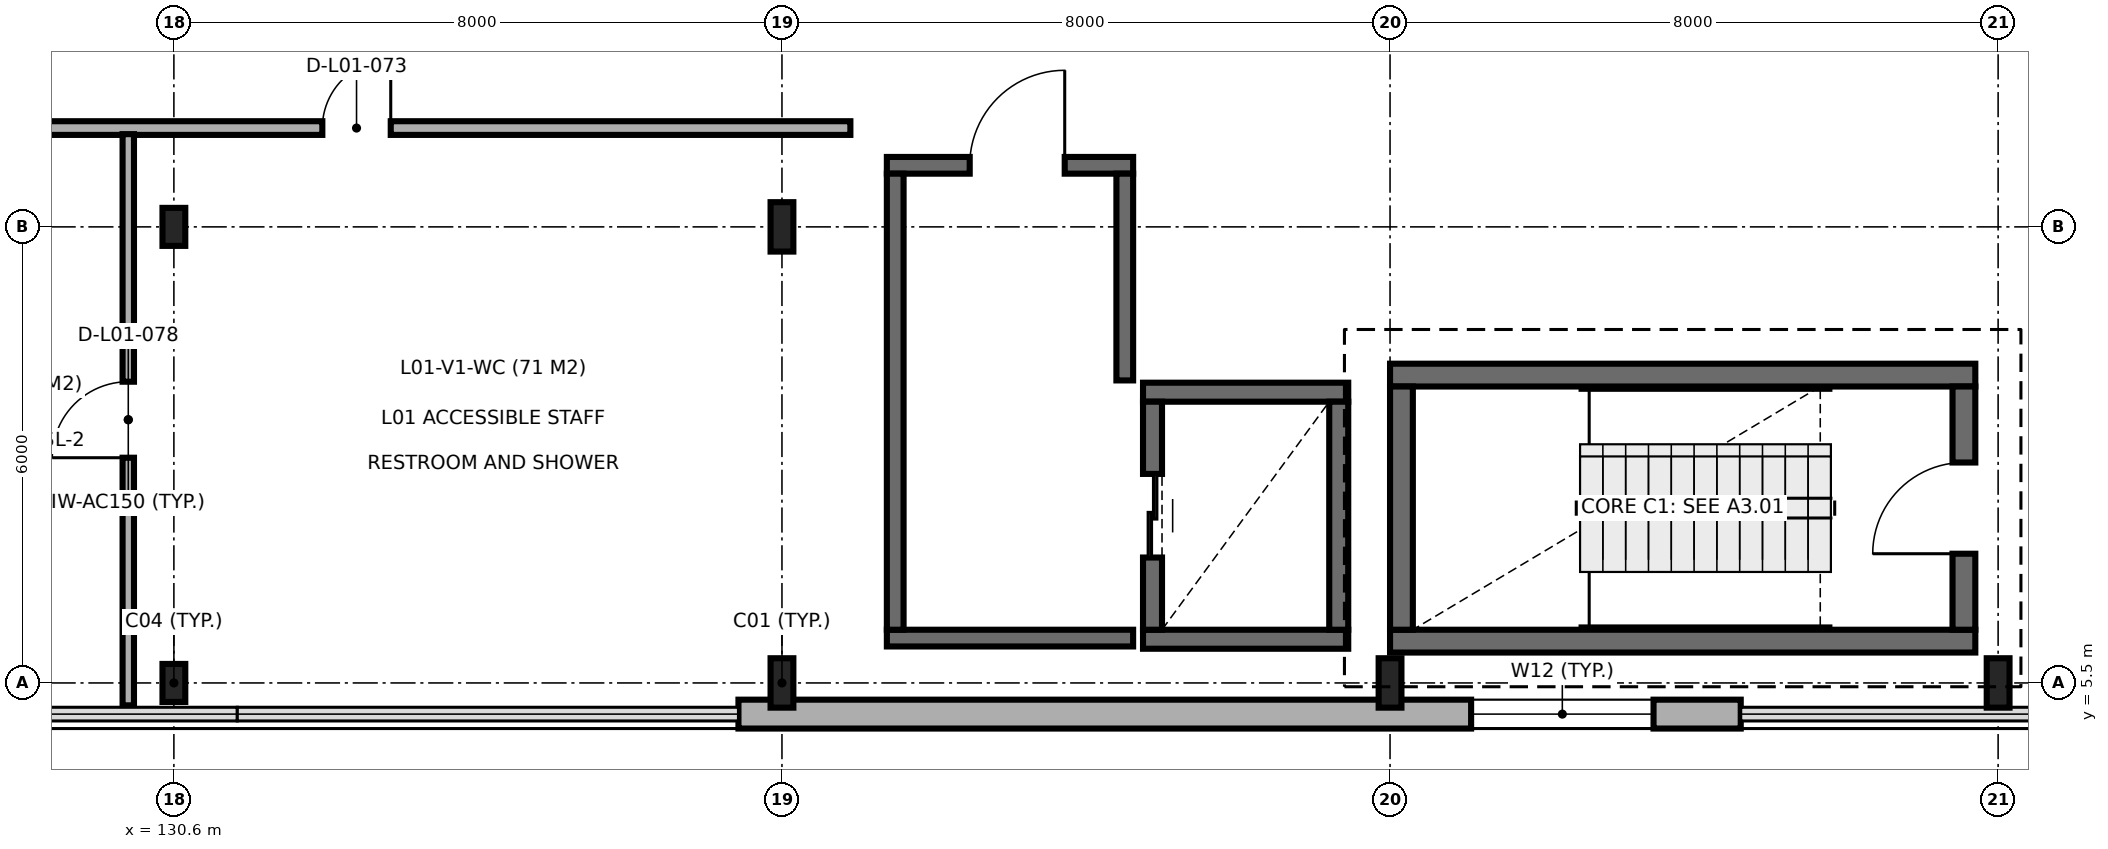
"""IFC4 building model, lengths in metres.
Left out: names, types, materials, properties, quantities, classifications, styles, units other than length and angle.
Written with IfcOpenShell. Run it as: python <this file> out.ifc"""

import sys

from ifc_helpers import new_model, si_unit, direction, frame, frame_2d, origin, origin_2d, place, context, subcontext, project, spatial, rectangle, i_section, extrude, element, fill, save


model = new_model("IFC4")
c1 = context("Model", 3, precision=1e-05, world=origin(), true_north=direction((0.0, 1.0)))
c2 = subcontext(c1, "Body", "Model", "MODEL_VIEW")
j1 = project(units=[si_unit("LENGTHUNIT", "METRE"), si_unit("PLANEANGLEUNIT", "RADIAN")], contexts=[c1])
p1 = place(None, origin())
s1 = spatial("IfcSite", under=j1, at=p1, CompositionType="ELEMENT")
p2 = place(p1, origin())
s2 = spatial("IfcBuilding", under=s1, at=p2, CompositionType="ELEMENT")
p3 = place(p2, frame((0.0, 0.0, 4.8)))
s3 = spatial("IfcBuildingStorey", under=s2, at=p3, CompositionType="ELEMENT", Elevation=4.8)
for number, where, z_axis, x_axis in (
    (1, (130.6, 5.5, 0.0), (0.0, 0.0, 1.0), (1.0, 0.0, 0.0)),
    (2, (130.6, 11.5, 0.0), (0.0, 0.0, 1.0), (1.0, 0.0, 0.0)),
):
    element("IfcColumn", number, at=place(p3, frame(where, z_axis=z_axis, x_axis=x_axis)), inside=s3, PredefinedType="COLUMN", context=c2, shape_type="SweptSolid", body=[
        extrude(i_section(OverallWidth=0.3, OverallDepth=0.5, WebThickness=0.014, FlangeThickness=0.028, FilletRadius=0.027, at=origin_2d()), origin(), (0.0, 0.0, 1.0), 4.5),
    ])
for number, where, z_axis, x_axis in (
    (3, (138.6, 5.5, 0.0), (0.0, 0.0, 1.0), (1.0, 0.0, 0.0)),
    (4, (138.6, 11.5, 0.0), (0.0, 0.0, 1.0), (1.0, 0.0, 0.0)),
    (5, (146.6, 5.5, 0.0), (0.0, 0.0, 1.0), (1.0, 0.0, 0.0)),
    (6, (154.6, 5.5, 0.0), (0.0, 0.0, 1.0), (1.0, 0.0, 0.0)),
):
    element("IfcColumn", number, at=place(p3, frame(where, z_axis=z_axis, x_axis=x_axis)), inside=s3, PredefinedType="COLUMN", context=c2, shape_type="SweptSolid", body=[
        extrude(i_section(OverallWidth=0.3, OverallDepth=0.65, WebThickness=0.016, FlangeThickness=0.031, FilletRadius=0.027, at=origin_2d()), origin(), (0.0, 0.0, 1.0), 4.5),
    ])
for number, where, z_axis, x_axis in (
    (7, (146.6, 6.05, 0.0), (0.0, 0.0, 1.0), (1.0, 0.0, 0.0)),
    (8, (154.3, 9.55, 0.0), (0.0, 0.0, 1.0), (-1.0, 0.0, 0.0)),
):
    element("IfcWall", number, at=place(p3, frame(where, z_axis=z_axis, x_axis=x_axis)), inside=s3, PredefinedType="SHEAR", context=c2, shape_type="SweptSolid", body=[
        extrude(rectangle(XDim=7.7, YDim=0.3, at=frame_2d((3.85, 0.0))), origin(), (0.0, 0.0, 1.0), 4.5),
    ])
p4 = place(p3, frame((146.75, 9.4, 0.0), z_axis=(0.0, 0.0, 1.0), x_axis=(0.0, -1.0, 0.0)))
e9 = element("IfcWall", 9, at=p4, inside=s3, PredefinedType="SHEAR", context=c2, shape_type="SweptSolid", body=[
    extrude(rectangle(XDim=3.2, YDim=0.3, at=frame_2d((1.6, 0.0))), origin(), (0.0, 0.0, 1.0), 4.5),
])
p5 = place(p3, frame((154.15, 6.2, 0.0), z_axis=(0.0, 0.0, 1.0), x_axis=(0.0, 1.0, 0.0)))
e10 = element("IfcWall", 10, at=p5, inside=s3, PredefinedType="SHEAR", context=c2, shape_type="SweptSolid", body=[
    extrude(rectangle(XDim=3.2, YDim=0.3, at=frame_2d((1.6, 0.0))), origin(), (0.0, 0.0, 1.0), 4.5),
])
p6 = place(p5, frame((1.0, 0.0, 0.0)))
e11 = element("IfcOpeningElement", 11, at=p6, cuts=e10, PredefinedType="OPENING", context=c2, shape_type="SweptSolid", body=[
    extrude(rectangle(XDim=1.2, YDim=2.15, at=frame_2d((0.6, 1.075))), frame((0.0, 0.16, 0.0), z_axis=(0.0, -1.0, 0.0), x_axis=(1.0, 0.0, 0.0)), (0.0, 0.0, 1.0), 0.32),
])
for number, where, z_axis, x_axis in (
    (12, (143.35, 6.075, 0.0), (0.0, 0.0, 1.0), (1.0, 0.0, 0.0)),
    (13, (146.05, 9.325, 0.0), (0.0, 0.0, 1.0), (-1.0, 0.0, 0.0)),
):
    element("IfcWall", number, at=place(p3, frame(where, z_axis=z_axis, x_axis=x_axis)), inside=s3, PredefinedType="SHEAR", context=c2, shape_type="SweptSolid", body=[
        extrude(rectangle(XDim=2.7, YDim=0.25, at=frame_2d((1.35, 0.0))), origin(), (0.0, 0.0, 1.0), 4.5),
    ])
p7 = place(p3, frame((143.475, 9.2, 0.0), z_axis=(0.0, 0.0, 1.0), x_axis=(0.0, -1.0, 0.0)))
e14 = element("IfcWall", 14, at=p7, inside=s3, PredefinedType="SHEAR", context=c2, shape_type="SweptSolid", body=[
    extrude(rectangle(XDim=3.0, YDim=0.25, at=frame_2d((1.5, 0.0))), origin(), (0.0, 0.0, 1.0), 4.5),
])
p8 = place(p7, frame((0.95, 0.0, 0.0)))
e15 = element("IfcOpeningElement", 15, at=p8, cuts=e14, PredefinedType="OPENING", context=c2, shape_type="SweptSolid", body=[
    extrude(rectangle(XDim=1.1, YDim=2.15, at=frame_2d((0.55, 1.075))), frame((0.0, 0.135, 0.0), z_axis=(0.0, -1.0, 0.0), x_axis=(1.0, 0.0, 0.0)), (0.0, 0.0, 1.0), 0.27),
])
p9 = place(p3, frame((145.925, 6.2, 0.0), z_axis=(0.0, 0.0, 1.0), x_axis=(0.0, 1.0, 0.0)))
e16 = element("IfcWall", 16, at=p9, inside=s3, PredefinedType="SHEAR", context=c2, shape_type="SweptSolid", body=[
    extrude(rectangle(XDim=3.0, YDim=0.25, at=frame_2d((1.5, 0.0))), origin(), (0.0, 0.0, 1.0), 4.5),
])
p10 = place(p3, frame((139.98, 6.09, 0.0), z_axis=(0.0, 0.0, 1.0), x_axis=(1.0, 0.0, 0.0)))
e17 = element("IfcWall", 17, at=p10, inside=s3, PredefinedType="SOLIDWALL", context=c2, shape_type="SweptSolid", body=[
    extrude(rectangle(XDim=3.24, YDim=0.22, at=frame_2d((1.62, 0.0))), origin(), (0.0, 0.0, 1.0), 4.25),
])
p11 = place(p3, frame((143.22, 12.31, 0.0), z_axis=(0.0, 0.0, 1.0), x_axis=(-1.0, 0.0, 0.0)))
e18 = element("IfcWall", 18, at=p11, inside=s3, PredefinedType="SOLIDWALL", context=c2, shape_type="SweptSolid", body=[
    extrude(rectangle(XDim=3.24, YDim=0.22, at=frame_2d((1.62, 0.0))), origin(), (0.0, 0.0, 1.0), 4.25),
])
p12 = place(p11, frame((0.9, 0.0, 0.0)))
e19 = element("IfcOpeningElement", 19, at=p12, cuts=e18, PredefinedType="OPENING", context=c2, shape_type="SweptSolid", body=[
    extrude(rectangle(XDim=1.25, YDim=2.15, at=frame_2d((0.625, 1.075))), frame((0.0, 0.12, 0.0), z_axis=(0.0, -1.0, 0.0), x_axis=(1.0, 0.0, 0.0)), (0.0, 0.0, 1.0), 0.24),
])
p13 = place(p3, frame((140.09, 12.2, 0.0), z_axis=(0.0, 0.0, 1.0), x_axis=(0.0, -1.0, 0.0)))
e20 = element("IfcWall", 20, at=p13, inside=s3, PredefinedType="SOLIDWALL", context=c2, shape_type="SweptSolid", body=[
    extrude(rectangle(XDim=6.0, YDim=0.22, at=frame_2d((3.0, 0.0))), origin(), (0.0, 0.0, 1.0), 4.25),
])
p14 = place(p3, frame((143.11, 9.48, 0.0), z_axis=(0.0, 0.0, 1.0), x_axis=(0.0, 1.0, 0.0)))
e21 = element("IfcWall", 21, at=p14, inside=s3, PredefinedType="SOLIDWALL", context=c2, shape_type="SweptSolid", body=[
    extrude(rectangle(XDim=2.72, YDim=0.22, at=frame_2d((1.36, 0.0))), origin(), (0.0, 0.0, 1.0), 4.25),
])
p15 = place(p3, frame((138.028, 5.09, 0.0), z_axis=(0.0, 0.0, 1.0), x_axis=(1.0, 0.0, 0.0)))
e22 = element("IfcWall", 22, at=p15, inside=s3, PredefinedType="SOLIDWALL", context=c2, shape_type="SweptSolid", body=[
    extrude(rectangle(XDim=13.186, YDim=0.38, at=frame_2d((6.593, 0.0))), origin(), (0.0, 0.0, 1.0), 4.25),
])
p16 = place(p15, frame((9.639, 0.0, 0.9)))
e23 = element("IfcOpeningElement", 23, at=p16, cuts=e22, PredefinedType="OPENING", context=c2, shape_type="SweptSolid", body=[
    extrude(rectangle(XDim=2.4, YDim=2.1, at=frame_2d((1.2, 1.05))), frame((0.0, 0.2, 0.0), z_axis=(0.0, -1.0, 0.0), x_axis=(1.0, 0.0, 0.0)), (0.0, 0.0, 1.0), 0.4),
])
p17 = place(p3, frame((105.005, 12.8, 0.0), z_axis=(0.0, 0.0, 1.0), x_axis=(1.0, 0.0, 0.0)))
e24 = element("IfcWall", 24, at=p17, inside=s3, PredefinedType="PARTITIONING", context=c2, shape_type="SweptSolid", body=[
    extrude(rectangle(XDim=34.495, YDim=0.18, at=frame_2d((17.248, 0.0))), origin(), (0.0, 0.0, 1.0), 4.25),
])
p18 = place(p17, frame((6.011, 0.0, 0.0)))
e25 = element("IfcOpeningElement", 25, at=p18, cuts=e24, PredefinedType="OPENING", context=c2, shape_type="SweptSolid", body=[
    extrude(rectangle(XDim=1.1, YDim=2.15, at=frame_2d((0.55, 1.075))), frame((0.0, 0.1, 0.0), z_axis=(0.0, -1.0, 0.0), x_axis=(1.0, 0.0, 0.0)), (0.0, 0.0, 1.0), 0.2),
])
p19 = place(p17, frame((11.548, 0.0, 0.0)))
e26 = element("IfcOpeningElement", 26, at=p19, cuts=e24, PredefinedType="OPENING", context=c2, shape_type="SweptSolid", body=[
    extrude(rectangle(XDim=1.5, YDim=2.2, at=frame_2d((0.75, 1.1))), frame((0.0, 0.1, 0.0), z_axis=(0.0, -1.0, 0.0), x_axis=(1.0, 0.0, 0.0)), (0.0, 0.0, 1.0), 0.2),
])
p20 = place(p17, frame((27.548, 0.0, 0.0)))
e27 = element("IfcOpeningElement", 27, at=p20, cuts=e24, PredefinedType="OPENING", context=c2, shape_type="SweptSolid", body=[
    extrude(rectangle(XDim=0.9, YDim=2.1, at=frame_2d((0.45, 1.05))), frame((0.0, 0.1, 0.0), z_axis=(0.0, -1.0, 0.0), x_axis=(1.0, 0.0, 0.0)), (0.0, 0.0, 1.0), 0.2),
])
p21 = place(p3, frame((130.0, 5.205, 0.0), z_axis=(0.0, 0.0, 1.0), x_axis=(0.0, 1.0, 0.0)))
e28 = element("IfcWall", 28, at=p21, inside=s3, PredefinedType="PARTITIONING", context=c2, shape_type="SweptSolid", body=[
    extrude(rectangle(XDim=7.515, YDim=0.15, at=frame_2d((3.757, 0.0))), origin(), (0.0, 0.0, 1.0), 4.25),
])
p22 = place(p21, frame((3.258, 0.0, 0.0)))
e29 = element("IfcOpeningElement", 29, at=p22, cuts=e28, PredefinedType="OPENING", context=c2, shape_type="SweptSolid", body=[
    extrude(rectangle(XDim=1.0, YDim=2.15, at=frame_2d((0.5, 1.075))), frame((0.0, 0.085, 0.0), z_axis=(0.0, -1.0, 0.0), x_axis=(1.0, 0.0, 0.0)), (0.0, 0.0, 1.0), 0.17),
])
p23 = place(p6, origin())
e30 = element("IfcDoor", 30, at=p23, inside=s3, OperationType="SINGLE_SWING_LEFT", PredefinedType="DOOR", context=c2, shape_type="SweptSolid", body=[
    extrude(rectangle(XDim=1.2, YDim=2.15, at=frame_2d((0.6, 1.075))), frame((0.0, 0.025, 0.0), z_axis=(0.0, -1.0, 0.0), x_axis=(1.0, 0.0, 0.0)), (0.0, 0.0, 1.0), 0.05),
])
fill(e11, e30)
p24 = place(p8, origin())
e31 = element("IfcDoor", 31, at=p24, inside=s3, OperationType="DOUBLE_DOOR_SLIDING", PredefinedType="DOOR", context=c2, shape_type="SweptSolid", body=[
    extrude(rectangle(XDim=1.1, YDim=2.15, at=frame_2d((0.55, 1.075))), frame((0.0, 0.025, 0.0), z_axis=(0.0, -1.0, 0.0), x_axis=(1.0, 0.0, 0.0)), (0.0, 0.0, 1.0), 0.05),
])
fill(e15, e31)
p25 = place(p12, frame((1.25, 0.0, 0.0), z_axis=(0.0, 0.0, 1.0), x_axis=(-1.0, 0.0, 0.0)))
e32 = element("IfcDoor", 32, at=p25, inside=s3, OperationType="SINGLE_SWING_LEFT", PredefinedType="DOOR", context=c2, shape_type="SweptSolid", body=[
    extrude(rectangle(XDim=1.25, YDim=2.15, at=frame_2d((0.625, 1.075))), frame((0.0, 0.025, 0.0), z_axis=(0.0, -1.0, 0.0), x_axis=(1.0, 0.0, 0.0)), (0.0, 0.0, 1.0), 0.05),
])
fill(e19, e32)
p26 = place(p16, origin())
e33 = element("IfcWindow", 33, at=p26, inside=s3, PartitioningType="SINGLE_PANEL", PredefinedType="WINDOW", context=c2, shape_type="SweptSolid", body=[
    extrude(rectangle(XDim=2.4, YDim=2.1, at=frame_2d((1.2, 1.05))), frame((0.0, 0.03, 0.0), z_axis=(0.0, -1.0, 0.0), x_axis=(1.0, 0.0, 0.0)), (0.0, 0.0, 1.0), 0.06),
])
fill(e23, e33)
p27 = place(p20, origin())
e34 = element("IfcDoor", 34, at=p27, inside=s3, OperationType="SINGLE_SWING_RIGHT", PredefinedType="DOOR", context=c2, shape_type="SweptSolid", body=[
    extrude(rectangle(XDim=0.9, YDim=2.1, at=frame_2d((0.45, 1.05))), frame((0.0, 0.025, 0.0), z_axis=(0.0, -1.0, 0.0), x_axis=(1.0, 0.0, 0.0)), (0.0, 0.0, 1.0), 0.05),
])
fill(e27, e34)
p28 = place(p22, origin())
e35 = element("IfcDoor", 35, at=p28, inside=s3, OperationType="SINGLE_SWING_LEFT", PredefinedType="DOOR", context=c2, shape_type="SweptSolid", body=[
    extrude(rectangle(XDim=1.0, YDim=2.15, at=frame_2d((0.5, 1.075))), frame((0.0, 0.025, 0.0), z_axis=(0.0, -1.0, 0.0), x_axis=(1.0, 0.0, 0.0)), (0.0, 0.0, 1.0), 0.05),
])
fill(e29, e35)
save(model, sys.argv[1])
